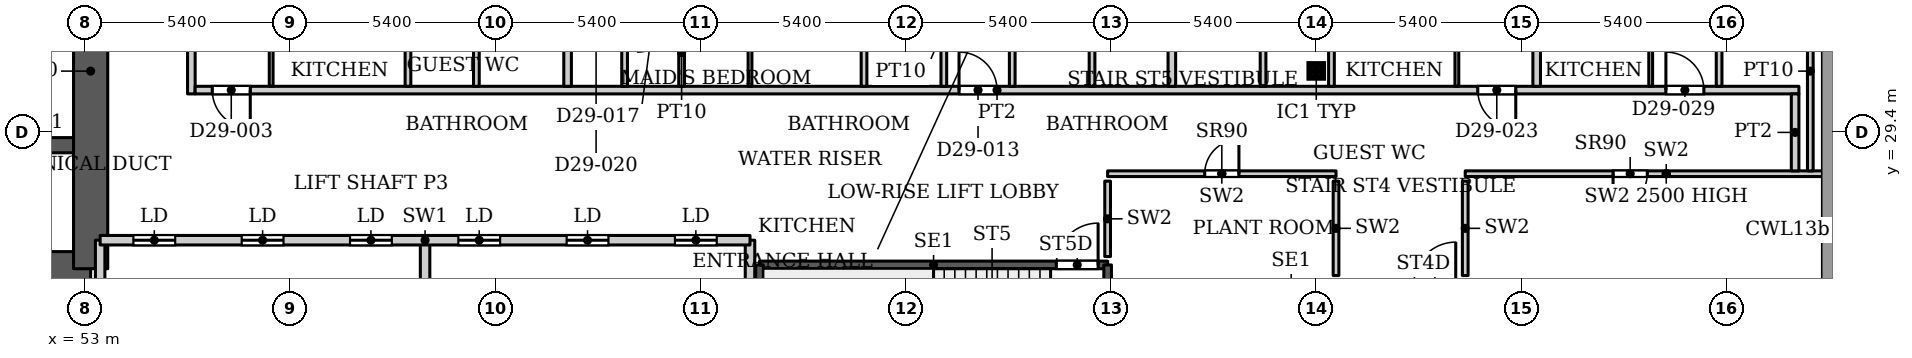
"""IFC4 building model, lengths in metres.
Left out: names, types, materials, properties, quantities, classifications, styles, units other than length and angle.
Written with IfcOpenShell. Run it as: python <this file> out.ifc"""

import sys

from ifc_helpers import new_model, si_unit, direction, frame, frame_2d, origin, origin_2d, place, context, subcontext, project, spatial, rectangle, hollow_rectangle, extrude, source, transform, mapped, element, fill, save


model = new_model("IFC4")
c1 = context("Model", 3, precision=1e-05, world=origin(), true_north=direction((0.0, 1.0)))
c2 = subcontext(c1, "Body", "Model", "MODEL_VIEW")
j1 = project(units=[si_unit("LENGTHUNIT", "METRE"), si_unit("PLANEANGLEUNIT", "RADIAN")], contexts=[c1])
p1 = place(None, origin())
s1 = spatial("IfcSite", under=j1, at=p1, CompositionType="ELEMENT")
p2 = place(p1, origin())
s2 = spatial("IfcBuilding", under=s1, at=p2, CompositionType="ELEMENT")
p3 = place(p2, frame((0.0, 0.0, 125.3)))
s3 = spatial("IfcBuildingStorey", under=s2, at=p3, CompositionType="ELEMENT", Elevation=125.3)
p4 = place(p3, frame((85.4, 31.005, 0.0), z_axis=(0.0, 0.0, 1.0), x_axis=(1.0, 0.0, 0.0)))
e1 = element("IfcColumn", 1, at=p4, inside=s3, PredefinedType="COLUMN", context=c2, shape_type="SweptSolid", body=[
    extrude(hollow_rectangle(XDim=0.356, YDim=0.356, WallThickness=0.016, InnerFilletRadius=0.016, OuterFilletRadius=0.032, at=origin_2d()), origin(), (0.0, 0.0, 1.0), 3.9),
])
p5 = place(p3, frame((34.75, 25.8, 0.0), z_axis=(0.0, 0.0, 1.0), x_axis=(1.0, 0.0, 0.0)))
e2 = element("IfcWall", 2, at=p5, inside=s3, PredefinedType="SHEAR", context=c2, shape_type="SweptSolid", body=[
    extrude(rectangle(XDim=18.4, YDim=0.9, at=frame_2d((9.2, 0.0))), origin(), (0.0, 0.0, 1.0), 3.9),
])
p6 = place(p3, frame((34.75, 29.05, 0.0), z_axis=(0.0, 0.0, 1.0), x_axis=(1.0, 0.0, 0.0)))
e3 = element("IfcWall", 3, at=p6, inside=s3, PredefinedType="SHEAR", context=c2, shape_type="SweptSolid", body=[
    extrude(rectangle(XDim=18.4, YDim=0.4, at=frame_2d((9.2, 0.0))), origin(), (0.0, 0.0, 1.0), 3.9),
])
p7 = place(p6, frame((15.125, 0.0, 0.0)))
e4 = element("IfcOpeningElement", 4, at=p7, cuts=e3, PredefinedType="OPENING", context=c2, shape_type="SweptSolid", body=[
    extrude(rectangle(XDim=1.1, YDim=2.2, at=frame_2d((0.55, 1.1))), frame((0.0, 0.21, 0.0), z_axis=(0.0, -1.0, 0.0), x_axis=(1.0, 0.0, 0.0)), (0.0, 0.0, 1.0), 0.42),
])
p8 = place(p3, frame((53.15, 25.8, 0.0), z_axis=(0.0, 0.0, 1.0), x_axis=(0.0, 1.0, 0.0)))
e5 = element("IfcWall", 5, at=p8, inside=s3, PredefinedType="SHEAR", context=c2, shape_type="SweptSolid", body=[
    extrude(rectangle(XDim=10.4, YDim=0.9, at=frame_2d((5.2, 0.0))), origin(), (0.0, 0.0, 1.0), 3.9),
])
p9 = place(p3, frame((70.75, 25.9, 0.0), z_axis=(0.0, 0.0, 1.0), x_axis=(1.0, 0.0, 0.0)))
e6 = element("IfcWall", 6, at=p9, inside=s3, PredefinedType="SHEAR", context=c2, shape_type="SweptSolid", body=[
    extrude(rectangle(XDim=9.16, YDim=0.2, at=frame_2d((4.58, 0.0))), origin(), (0.0, 0.0, 1.0), 3.9),
])
p10 = place(p9, frame((7.81, 0.0, 0.0)))
e7 = element("IfcOpeningElement", 7, at=p10, cuts=e6, PredefinedType="OPENING", context=c2, shape_type="SweptSolid", body=[
    extrude(rectangle(XDim=1.1, YDim=2.2, at=frame_2d((0.55, 1.1))), frame((0.0, 0.11, 0.0), z_axis=(0.0, -1.0, 0.0), x_axis=(1.0, 0.0, 0.0)), (0.0, 0.0, 1.0), 0.22),
])
for number, where, z_axis, x_axis in (
    (8, (70.75, 22.75, 0.0), (0.0, 0.0, 1.0), (0.0, 1.0, 0.0)),
    (9, (79.91, 22.75, 0.0), (0.0, 0.0, 1.0), (0.0, 1.0, 0.0)),
):
    element("IfcWall", number, at=place(p3, frame(where, z_axis=z_axis, x_axis=x_axis)), inside=s3, PredefinedType="SHEAR", context=c2, shape_type="SweptSolid", body=[
        extrude(rectangle(XDim=3.15, YDim=0.2, at=frame_2d((1.575, 0.0))), origin(), (0.0, 0.0, 1.0), 3.9),
    ])
for number, where, z_axis, x_axis in (
    (10, (53.4, 23.7, 0.0), (0.0, 0.0, 1.0), (0.0, 1.0, 0.0)),
    (11, (61.95, 23.7, 0.0), (0.0, 0.0, 1.0), (0.0, 1.0, 0.0)),
    (12, (70.5, 23.7, 0.0), (0.0, 0.0, 1.0), (0.0, 1.0, 0.0)),
):
    element("IfcWall", number, at=place(p3, frame(where, z_axis=z_axis, x_axis=x_axis)), inside=s3, PredefinedType="PARTITIONING", context=c2, shape_type="SweptSolid", body=[
        extrude(rectangle(XDim=2.85, YDim=0.25, at=frame_2d((1.425, 0.0))), origin(), (0.0, 0.0, 1.0), 3.9),
    ])
p11 = place(p3, frame((53.4, 26.55, 0.0), z_axis=(0.0, 0.0, 1.0), x_axis=(1.0, 0.0, 0.0)))
e13 = element("IfcWall", 13, at=p11, inside=s3, PredefinedType="PARTITIONING", context=c2, shape_type="SweptSolid", body=[
    extrude(rectangle(XDim=17.1, YDim=0.25, at=frame_2d((8.55, 0.0))), origin(), (0.0, 0.0, 1.0), 3.9),
])
p12 = place(p11, frame((0.875, 0.0, 0.0)))
e14 = element("IfcOpeningElement", 14, at=p12, cuts=e13, PredefinedType="OPENING", context=c2, shape_type="SweptSolid", body=[
    extrude(rectangle(XDim=1.1, YDim=2.2, at=frame_2d((0.55, 1.1))), frame((0.0, 0.135, 0.0), z_axis=(0.0, -1.0, 0.0), x_axis=(1.0, 0.0, 0.0)), (0.0, 0.0, 1.0), 0.27),
])
p13 = place(p11, frame((3.725, 0.0, 0.0)))
e15 = element("IfcOpeningElement", 15, at=p13, cuts=e13, PredefinedType="OPENING", context=c2, shape_type="SweptSolid", body=[
    extrude(rectangle(XDim=1.1, YDim=2.2, at=frame_2d((0.55, 1.1))), frame((0.0, 0.135, 0.0), z_axis=(0.0, -1.0, 0.0), x_axis=(1.0, 0.0, 0.0)), (0.0, 0.0, 1.0), 0.27),
])
p14 = place(p11, frame((6.575, 0.0, 0.0)))
e16 = element("IfcOpeningElement", 16, at=p14, cuts=e13, PredefinedType="OPENING", context=c2, shape_type="SweptSolid", body=[
    extrude(rectangle(XDim=1.1, YDim=2.2, at=frame_2d((0.55, 1.1))), frame((0.0, 0.135, 0.0), z_axis=(0.0, -1.0, 0.0), x_axis=(1.0, 0.0, 0.0)), (0.0, 0.0, 1.0), 0.27),
])
p15 = place(p11, frame((9.425, 0.0, 0.0)))
e17 = element("IfcOpeningElement", 17, at=p15, cuts=e13, PredefinedType="OPENING", context=c2, shape_type="SweptSolid", body=[
    extrude(rectangle(XDim=1.1, YDim=2.2, at=frame_2d((0.55, 1.1))), frame((0.0, 0.135, 0.0), z_axis=(0.0, -1.0, 0.0), x_axis=(1.0, 0.0, 0.0)), (0.0, 0.0, 1.0), 0.27),
])
p16 = place(p11, frame((12.275, 0.0, 0.0)))
e18 = element("IfcOpeningElement", 18, at=p16, cuts=e13, PredefinedType="OPENING", context=c2, shape_type="SweptSolid", body=[
    extrude(rectangle(XDim=1.1, YDim=2.2, at=frame_2d((0.55, 1.1))), frame((0.0, 0.135, 0.0), z_axis=(0.0, -1.0, 0.0), x_axis=(1.0, 0.0, 0.0)), (0.0, 0.0, 1.0), 0.27),
])
p17 = place(p11, frame((15.125, 0.0, 0.0)))
e19 = element("IfcOpeningElement", 19, at=p17, cuts=e13, PredefinedType="OPENING", context=c2, shape_type="SweptSolid", body=[
    extrude(rectangle(XDim=1.1, YDim=2.2, at=frame_2d((0.55, 1.1))), frame((0.0, 0.135, 0.0), z_axis=(0.0, -1.0, 0.0), x_axis=(1.0, 0.0, 0.0)), (0.0, 0.0, 1.0), 0.27),
])
p18 = place(p3, frame((79.91, 28.3, 0.0), z_axis=(0.0, 0.0, 1.0), x_axis=(1.0, 0.0, 0.0)))
e20 = element("IfcWall", 20, at=p18, inside=s3, PredefinedType="PARTITIONING", context=c2, shape_type="SweptSolid", body=[
    extrude(rectangle(XDim=6.01, YDim=0.15, at=frame_2d((3.005, 0.0))), origin(), (0.0, 0.0, 1.0), 3.9),
])
p19 = place(p18, frame((2.555, 0.0, 0.0)))
e21 = element("IfcOpeningElement", 21, at=p19, cuts=e20, PredefinedType="OPENING", context=c2, shape_type="SweptSolid", body=[
    extrude(rectangle(XDim=0.9, YDim=2.2, at=frame_2d((0.45, 1.1))), frame((0.0, 0.085, 0.0), z_axis=(0.0, -1.0, 0.0), x_axis=(1.0, 0.0, 0.0)), (0.0, 0.0, 1.0), 0.17),
])
p20 = place(p3, frame((79.91, 26.12, 0.0), z_axis=(0.0, 0.0, 1.0), x_axis=(0.0, 1.0, 0.0)))
e22 = element("IfcWall", 22, at=p20, inside=s3, PredefinedType="PARTITIONING", context=c2, shape_type="SweptSolid", body=[
    extrude(rectangle(XDim=1.985, YDim=0.15, at=frame_2d((0.992, 0.0))), origin(), (0.0, 0.0, 1.0), 3.9),
])
p21 = place(p3, frame((85.92, 25.62, 0.0), z_axis=(0.0, 0.0, 1.0), x_axis=(0.0, 1.0, 0.0)))
e23 = element("IfcWall", 23, at=p21, inside=s3, PredefinedType="PARTITIONING", context=c2, shape_type="SweptSolid", body=[
    extrude(rectangle(XDim=2.485, YDim=0.15, at=frame_2d((1.242, 0.0))), origin(), (0.0, 0.0, 1.0), 3.9),
])
p22 = place(p3, frame((89.32, 28.3, 0.0), z_axis=(0.0, 0.0, 1.0), x_axis=(1.0, 0.0, 0.0)))
e24 = element("IfcWall", 24, at=p22, inside=s3, PredefinedType="PARTITIONING", context=c2, shape_type="SweptSolid", body=[
    extrude(rectangle(XDim=10.578, YDim=0.15, at=frame_2d((5.289, 0.0))), origin(), (0.0, 0.0, 1.0), 2.5),
])
p23 = place(p22, frame((3.89, 0.0, 0.0)))
e25 = element("IfcOpeningElement", 25, at=p23, cuts=e24, PredefinedType="OPENING", context=c2, shape_type="SweptSolid", body=[
    extrude(rectangle(XDim=0.9, YDim=2.2, at=frame_2d((0.45, 1.1))), frame((0.0, 0.085, 0.0), z_axis=(0.0, -1.0, 0.0), x_axis=(1.0, 0.0, 0.0)), (0.0, 0.0, 1.0), 0.17),
])
p24 = place(p3, frame((89.32, 25.62, 0.0), z_axis=(0.0, 0.0, 1.0), x_axis=(0.0, 1.0, 0.0)))
e26 = element("IfcWall", 26, at=p24, inside=s3, PredefinedType="PARTITIONING", context=c2, shape_type="SweptSolid", body=[
    extrude(rectangle(XDim=2.485, YDim=0.15, at=frame_2d((1.242, 0.0))), origin(), (0.0, 0.0, 1.0), 3.9),
])
p25 = place(p3, frame((55.8, 30.4, 0.0), z_axis=(0.0, 0.0, 1.0), x_axis=(0.0, 1.0, 0.0)))
e27 = element("IfcWall", 27, at=p25, inside=s3, PredefinedType="PARTITIONING", context=c2, shape_type="SweptSolid", body=[
    extrude(rectangle(XDim=13.5, YDim=0.2, at=frame_2d((6.75, 0.0))), origin(), (0.0, 0.0, 1.0), 3.6),
])
p26 = place(p3, frame((55.9, 30.5, 0.0), z_axis=(0.0, 0.0, 1.0), x_axis=(1.0, 0.0, 0.0)))
e28 = element("IfcWall", 28, at=p26, inside=s3, PredefinedType="PARTITIONING", context=c2, shape_type="SweptSolid", body=[
    extrude(rectangle(XDim=42.2, YDim=0.2, at=frame_2d((21.1, 0.0))), origin(), (0.0, 0.0, 1.0), 3.6),
])
p27 = place(p26, frame((0.45, 0.0, 0.0)))
e29 = element("IfcOpeningElement", 29, at=p27, cuts=e28, PredefinedType="OPENING", context=c2, shape_type="SweptSolid", body=[
    extrude(rectangle(XDim=1.0, YDim=2.1, at=frame_2d((0.5, 1.05))), frame((0.0, 0.11, 0.0), z_axis=(0.0, -1.0, 0.0), x_axis=(1.0, 0.0, 0.0)), (0.0, 0.0, 1.0), 0.22),
])
p28 = place(p26, frame((20.1, 0.0, 0.0)))
e30 = element("IfcOpeningElement", 30, at=p28, cuts=e28, PredefinedType="OPENING", context=c2, shape_type="SweptSolid", body=[
    extrude(rectangle(XDim=1.0, YDim=2.1, at=frame_2d((0.5, 1.05))), frame((0.0, 0.11, 0.0), z_axis=(0.0, -1.0, 0.0), x_axis=(1.0, 0.0, 0.0)), (0.0, 0.0, 1.0), 0.22),
])
p29 = place(p26, frame((33.75, 0.0, 0.0)))
e31 = element("IfcOpeningElement", 31, at=p29, cuts=e28, PredefinedType="OPENING", context=c2, shape_type="SweptSolid", body=[
    extrude(rectangle(XDim=1.0, YDim=2.1, at=frame_2d((0.5, 1.05))), frame((0.0, 0.11, 0.0), z_axis=(0.0, -1.0, 0.0), x_axis=(1.0, 0.0, 0.0)), (0.0, 0.0, 1.0), 0.22),
])
p30 = place(p26, frame((38.7, 0.0, 0.0)))
e32 = element("IfcOpeningElement", 32, at=p30, cuts=e28, PredefinedType="OPENING", context=c2, shape_type="SweptSolid", body=[
    extrude(rectangle(XDim=1.0, YDim=2.1, at=frame_2d((0.5, 1.05))), frame((0.0, 0.11, 0.0), z_axis=(0.0, -1.0, 0.0), x_axis=(1.0, 0.0, 0.0)), (0.0, 0.0, 1.0), 0.22),
])
p31 = place(p3, frame((57.9, 30.6, 0.0), z_axis=(0.0, 0.0, 1.0), x_axis=(0.0, 1.0, 0.0)))
e33 = element("IfcWall", 33, at=p31, inside=s3, PredefinedType="PARTITIONING", context=c2, shape_type="SweptSolid", body=[
    extrude(rectangle(XDim=3.025, YDim=0.1, at=frame_2d((1.512, 0.0))), origin(), (0.0, 0.0, 1.0), 3.6),
])
for number, where, z_axis, x_axis in (
    (34, (61.5, 30.6, 0.0), (0.0, 0.0, 1.0), (0.0, 1.0, 0.0)),
    (35, (63.3, 30.6, 0.0), (0.0, 0.0, 1.0), (0.0, 1.0, 0.0)),
):
    element("IfcWall", number, at=place(p3, frame(where, z_axis=z_axis, x_axis=x_axis)), inside=s3, PredefinedType="PARTITIONING", context=c2, shape_type="SweptSolid", body=[
        extrude(rectangle(XDim=3.025, YDim=0.15, at=frame_2d((1.512, 0.0))), origin(), (0.0, 0.0, 1.0), 3.6),
    ])
p32 = place(p3, frame((65.7, 30.6, 0.0), z_axis=(0.0, 0.0, 1.0), x_axis=(0.0, 1.0, 0.0)))
e36 = element("IfcWall", 36, at=p32, inside=s3, PredefinedType="PARTITIONING", context=c2, shape_type="SweptSolid", body=[
    extrude(rectangle(XDim=13.3, YDim=0.2, at=frame_2d((6.65, 0.0))), origin(), (0.0, 0.0, 1.0), 3.6),
])
p33 = place(p3, frame((67.2, 30.6, 0.0), z_axis=(0.0, 0.0, 1.0), x_axis=(0.0, 1.0, 0.0)))
e37 = element("IfcWall", 37, at=p33, inside=s3, PredefinedType="PARTITIONING", context=c2, shape_type="SweptSolid", body=[
    extrude(rectangle(XDim=3.025, YDim=0.15, at=frame_2d((1.512, 0.0))), origin(), (0.0, 0.0, 1.0), 3.6),
])
p34 = place(p3, frame((68.7, 30.6, 0.0), z_axis=(0.0, 0.0, 1.0), x_axis=(0.0, 1.0, 0.0)))
e38 = element("IfcWall", 38, at=p34, inside=s3, PredefinedType="PARTITIONING", context=c2, shape_type="SweptSolid", body=[
    extrude(rectangle(XDim=1.775, YDim=0.15, at=frame_2d((0.887, 0.0))), origin(), (0.0, 0.0, 1.0), 3.6),
])
p35 = place(p3, frame((70.5, 30.6, 0.0), z_axis=(0.0, 0.0, 1.0), x_axis=(0.0, 1.0, 0.0)))
e39 = element("IfcWall", 39, at=p35, inside=s3, PredefinedType="PARTITIONING", context=c2, shape_type="SweptSolid", body=[
    extrude(rectangle(XDim=3.025, YDim=0.1, at=frame_2d((1.512, 0.0))), origin(), (0.0, 0.0, 1.0), 3.6),
])
for number, where, z_axis, x_axis in (
    (40, (73.5, 30.6, 0.0), (0.0, 0.0, 1.0), (0.0, 1.0, 0.0)),
    (41, (75.6, 30.6, 0.0), (0.0, 0.0, 1.0), (0.0, 1.0, 0.0)),
    (42, (77.4, 30.6, 0.0), (0.0, 0.0, 1.0), (0.0, 1.0, 0.0)),
    (43, (79.5, 30.6, 0.0), (0.0, 0.0, 1.0), (0.0, 1.0, 0.0)),
):
    element("IfcWall", number, at=place(p3, frame(where, z_axis=z_axis, x_axis=x_axis)), inside=s3, PredefinedType="PARTITIONING", context=c2, shape_type="SweptSolid", body=[
        extrude(rectangle(XDim=3.025, YDim=0.15, at=frame_2d((1.512, 0.0))), origin(), (0.0, 0.0, 1.0), 3.6),
    ])
p36 = place(p3, frame((81.6, 30.6, 0.0), z_axis=(0.0, 0.0, 1.0), x_axis=(0.0, 1.0, 0.0)))
e44 = element("IfcWall", 44, at=p36, inside=s3, PredefinedType="PARTITIONING", context=c2, shape_type="SweptSolid", body=[
    extrude(rectangle(XDim=13.3, YDim=0.2, at=frame_2d((6.65, 0.0))), origin(), (0.0, 0.0, 1.0), 3.6),
])
for number, where, z_axis, x_axis in (
    (45, (84.0, 30.6, 0.0), (0.0, 0.0, 1.0), (0.0, 1.0, 0.0)),
    (46, (85.8, 30.6, 0.0), (0.0, 0.0, 1.0), (0.0, 1.0, 0.0)),
):
    element("IfcWall", number, at=place(p3, frame(where, z_axis=z_axis, x_axis=x_axis)), inside=s3, PredefinedType="PARTITIONING", context=c2, shape_type="SweptSolid", body=[
        extrude(rectangle(XDim=3.025, YDim=0.15, at=frame_2d((1.512, 0.0))), origin(), (0.0, 0.0, 1.0), 3.6),
    ])
p37 = place(p3, frame((89.1, 30.6, 0.0), z_axis=(0.0, 0.0, 1.0), x_axis=(0.0, 1.0, 0.0)))
e47 = element("IfcWall", 47, at=p37, inside=s3, PredefinedType="PARTITIONING", context=c2, shape_type="SweptSolid", body=[
    extrude(rectangle(XDim=3.025, YDim=0.1, at=frame_2d((1.512, 0.0))), origin(), (0.0, 0.0, 1.0), 3.6),
])
p38 = place(p3, frame((91.2, 30.6, 0.0), z_axis=(0.0, 0.0, 1.0), x_axis=(0.0, 1.0, 0.0)))
e48 = element("IfcWall", 48, at=p38, inside=s3, PredefinedType="PARTITIONING", context=c2, shape_type="SweptSolid", body=[
    extrude(rectangle(XDim=13.3, YDim=0.2, at=frame_2d((6.65, 0.0))), origin(), (0.0, 0.0, 1.0), 3.6),
])
p39 = place(p3, frame((94.2, 30.6, 0.0), z_axis=(0.0, 0.0, 1.0), x_axis=(0.0, 1.0, 0.0)))
e49 = element("IfcWall", 49, at=p39, inside=s3, PredefinedType="PARTITIONING", context=c2, shape_type="SweptSolid", body=[
    extrude(rectangle(XDim=3.15, YDim=0.1, at=frame_2d((1.575, 0.0))), origin(), (0.0, 0.0, 1.0), 3.6),
])
p40 = place(p3, frame((96.0, 30.6, 0.0), z_axis=(0.0, 0.0, 1.0), x_axis=(0.0, 1.0, 0.0)))
e50 = element("IfcWall", 50, at=p40, inside=s3, PredefinedType="PARTITIONING", context=c2, shape_type="SweptSolid", body=[
    extrude(rectangle(XDim=3.025, YDim=0.15, at=frame_2d((1.512, 0.0))), origin(), (0.0, 0.0, 1.0), 3.6),
])
p41 = place(p3, frame((98.0, 28.374, 0.0), z_axis=(0.0, 0.0, 1.0), x_axis=(0.0, 1.0, 0.0)))
e51 = element("IfcWall", 51, at=p41, inside=s3, PredefinedType="PARTITIONING", context=c2, shape_type="SweptSolid", body=[
    extrude(rectangle(XDim=2.026, YDim=0.2, at=frame_2d((1.013, 0.0))), origin(), (0.0, 0.0, 1.0), 3.6),
])
p42 = place(p3, frame((98.4, 28.374, 0.0), z_axis=(0.0, 0.0, 1.0), x_axis=(0.0, 1.0, 0.0)))
e52 = element("IfcWall", 52, at=p42, inside=s3, PredefinedType="PARTITIONING", context=c2, shape_type="SweptSolid", body=[
    extrude(rectangle(XDim=5.251, YDim=0.15, at=frame_2d((2.625, 0.0))), origin(), (0.0, 0.0, 1.0), 3.6),
])
m1 = source(origin(), c2, "Body", "SweptSolid", [
    extrude(rectangle(XDim=1.1, YDim=2.2, at=frame_2d((0.55, 1.1))), frame((0.0, 0.025, 0.0), z_axis=(0.0, -1.0, 0.0), x_axis=(1.0, 0.0, 0.0)), (0.0, 0.0, 1.0), 0.05),
])
p43 = place(p12, origin())
e53 = element("IfcDoor", 53, at=p43, inside=s3, OperationType="SLIDING_TO_LEFT", PredefinedType="DOOR", context=c2, shape_type="MappedRepresentation", body=[
    mapped(m1, transform((0.0, 0.0, 0.0), x_axis=(1.0, 0.0, 0.0), y_axis=(0.0, 1.0, 0.0), z_axis=(0.0, 0.0, 1.0), scale=1.0)),
])
fill(e14, e53)
p44 = place(p13, origin())
e54 = element("IfcDoor", 54, at=p44, inside=s3, OperationType="SLIDING_TO_LEFT", PredefinedType="DOOR", context=c2, shape_type="MappedRepresentation", body=[
    mapped(m1, transform((0.0, 0.0, 0.0), x_axis=(1.0, 0.0, 0.0), y_axis=(0.0, 1.0, 0.0), z_axis=(0.0, 0.0, 1.0), scale=1.0)),
])
fill(e15, e54)
p45 = place(p14, origin())
e55 = element("IfcDoor", 55, at=p45, inside=s3, OperationType="SLIDING_TO_LEFT", PredefinedType="DOOR", context=c2, shape_type="MappedRepresentation", body=[
    mapped(m1, transform((0.0, 0.0, 0.0), x_axis=(1.0, 0.0, 0.0), y_axis=(0.0, 1.0, 0.0), z_axis=(0.0, 0.0, 1.0), scale=1.0)),
])
fill(e16, e55)
p46 = place(p15, origin())
e56 = element("IfcDoor", 56, at=p46, inside=s3, OperationType="SLIDING_TO_LEFT", PredefinedType="DOOR", context=c2, shape_type="MappedRepresentation", body=[
    mapped(m1, transform((0.0, 0.0, 0.0), x_axis=(1.0, 0.0, 0.0), y_axis=(0.0, 1.0, 0.0), z_axis=(0.0, 0.0, 1.0), scale=1.0)),
])
fill(e17, e56)
p47 = place(p16, origin())
e57 = element("IfcDoor", 57, at=p47, inside=s3, OperationType="SLIDING_TO_LEFT", PredefinedType="DOOR", context=c2, shape_type="MappedRepresentation", body=[
    mapped(m1, transform((0.0, 0.0, 0.0), x_axis=(1.0, 0.0, 0.0), y_axis=(0.0, 1.0, 0.0), z_axis=(0.0, 0.0, 1.0), scale=1.0)),
])
fill(e18, e57)
p48 = place(p17, origin())
e58 = element("IfcDoor", 58, at=p48, inside=s3, OperationType="SLIDING_TO_LEFT", PredefinedType="DOOR", context=c2, shape_type="MappedRepresentation", body=[
    mapped(m1, transform((0.0, 0.0, 0.0), x_axis=(1.0, 0.0, 0.0), y_axis=(0.0, 1.0, 0.0), z_axis=(0.0, 0.0, 1.0), scale=1.0)),
])
fill(e19, e58)
m2 = source(origin(), c2, "Body", "SweptSolid", [
    extrude(rectangle(XDim=0.9, YDim=2.2, at=frame_2d((0.45, 1.1))), frame((0.0, 0.025, 0.0), z_axis=(0.0, -1.0, 0.0), x_axis=(1.0, 0.0, 0.0)), (0.0, 0.0, 1.0), 0.05),
])
p49 = place(p19, origin())
e59 = element("IfcDoor", 59, at=p49, inside=s3, OperationType="SINGLE_SWING_LEFT", PredefinedType="DOOR", context=c2, shape_type="MappedRepresentation", body=[
    mapped(m2, transform((0.0, 0.0, 0.0), x_axis=(1.0, 0.0, 0.0), y_axis=(0.0, 1.0, 0.0), z_axis=(0.0, 0.0, 1.0), scale=1.0)),
])
fill(e21, e59)
p50 = place(p23, origin())
e60 = element("IfcDoor", 60, at=p50, inside=s3, OperationType="SINGLE_SWING_RIGHT", PredefinedType="DOOR", context=c2, shape_type="MappedRepresentation", body=[
    mapped(m2, transform((0.0, 0.0, 0.0), x_axis=(1.0, 0.0, 0.0), y_axis=(0.0, 1.0, 0.0), z_axis=(0.0, 0.0, 1.0), scale=1.0)),
])
fill(e25, e60)
m3 = source(origin(), c2, "Body", "SweptSolid", [
    extrude(rectangle(XDim=1.1, YDim=2.2, at=frame_2d((0.55, 1.1))), frame((0.0, 0.025, 0.0), z_axis=(0.0, -1.0, 0.0), x_axis=(1.0, 0.0, 0.0)), (0.0, 0.0, 1.0), 0.05),
])
p51 = place(p10, origin())
e61 = element("IfcDoor", 61, at=p51, inside=s3, OperationType="SINGLE_SWING_LEFT", PredefinedType="DOOR", context=c2, shape_type="MappedRepresentation", body=[
    mapped(m3, transform((0.0, 0.0, 0.0), x_axis=(1.0, 0.0, 0.0), y_axis=(0.0, 1.0, 0.0), z_axis=(0.0, 0.0, 1.0), scale=1.0)),
])
fill(e7, e61)
m4 = source(origin(), c2, "Body", "SweptSolid", [
    extrude(rectangle(XDim=1.0, YDim=2.1, at=frame_2d((0.5, 1.05))), frame((0.0, 0.025, 0.0), z_axis=(0.0, -1.0, 0.0), x_axis=(1.0, 0.0, 0.0)), (0.0, 0.0, 1.0), 0.05),
])
p52 = place(p27, origin())
e62 = element("IfcDoor", 62, at=p52, inside=s3, OperationType="SINGLE_SWING_RIGHT", PredefinedType="DOOR", context=c2, shape_type="MappedRepresentation", body=[
    mapped(m4, transform((0.0, 0.0, 0.0), x_axis=(1.0, 0.0, 0.0), y_axis=(0.0, 1.0, 0.0), z_axis=(0.0, 0.0, 1.0), scale=1.0)),
])
fill(e29, e62)
p53 = place(p28, origin())
e63 = element("IfcDoor", 63, at=p53, inside=s3, OperationType="SINGLE_SWING_LEFT", PredefinedType="DOOR", context=c2, shape_type="MappedRepresentation", body=[
    mapped(m4, transform((0.0, 0.0, 0.0), x_axis=(1.0, 0.0, 0.0), y_axis=(0.0, 1.0, 0.0), z_axis=(0.0, 0.0, 1.0), scale=1.0)),
])
fill(e30, e63)
p54 = place(p29, origin())
e64 = element("IfcDoor", 64, at=p54, inside=s3, OperationType="SINGLE_SWING_RIGHT", PredefinedType="DOOR", context=c2, shape_type="MappedRepresentation", body=[
    mapped(m4, transform((0.0, 0.0, 0.0), x_axis=(1.0, 0.0, 0.0), y_axis=(0.0, 1.0, 0.0), z_axis=(0.0, 0.0, 1.0), scale=1.0)),
])
fill(e31, e64)
p55 = place(p30, origin())
e65 = element("IfcDoor", 65, at=p55, inside=s3, OperationType="SINGLE_SWING_LEFT", PredefinedType="DOOR", context=c2, shape_type="MappedRepresentation", body=[
    mapped(m4, transform((0.0, 0.0, 0.0), x_axis=(1.0, 0.0, 0.0), y_axis=(0.0, 1.0, 0.0), z_axis=(0.0, 0.0, 1.0), scale=1.0)),
])
fill(e32, e65)
save(model, sys.argv[1])
